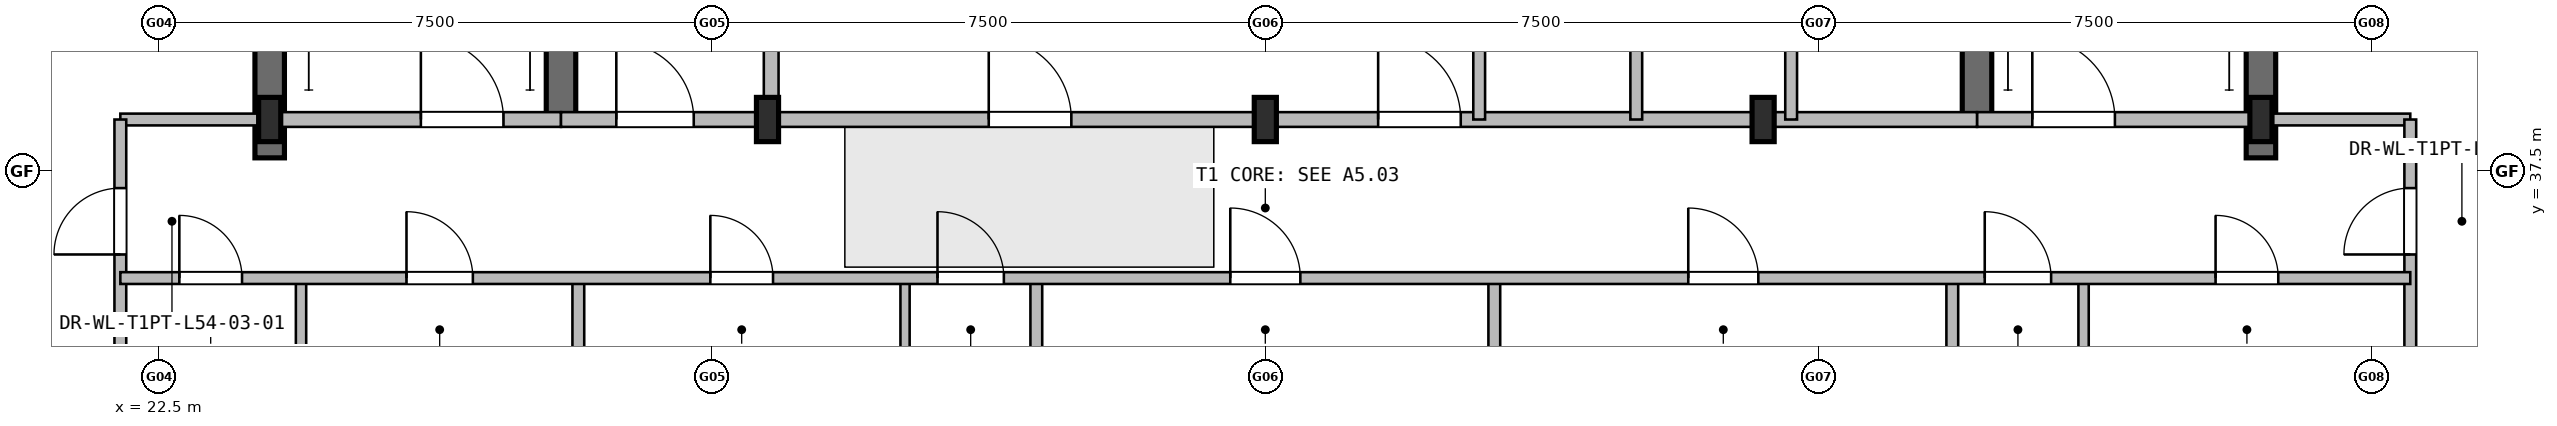
"""IFC4 building model, lengths in metres.
Left out: names, types, materials, properties, quantities, classifications, styles, units other than length and angle.
Written with IfcOpenShell. Run it as: python <this file> out.ifc"""

import sys

from ifc_helpers import new_model, si_unit, direction, frame, frame_2d, origin, origin_2d, place, context, subcontext, project, spatial, rectangle, i_section, extrude, element, fill, save


model = new_model("IFC4")
c1 = context("Model", 3, precision=1e-05, world=origin(), true_north=direction((0.0, 1.0)))
c2 = subcontext(c1, "Body", "Model", "MODEL_VIEW")
j1 = project(units=[si_unit("LENGTHUNIT", "METRE"), si_unit("PLANEANGLEUNIT", "RADIAN")], contexts=[c1])
p1 = place(None, origin())
s1 = spatial("IfcSite", under=j1, at=p1, CompositionType="ELEMENT")
p2 = place(p1, origin())
s2 = spatial("IfcBuilding", under=s1, at=p2, CompositionType="ELEMENT")
p3 = place(p2, frame((0.0, 0.0, 197.1)))
s3 = spatial("IfcBuildingStorey", under=s2, at=p3, CompositionType="ELEMENT", Elevation=197.1)
for number, where, z_axis, x_axis in (
    (1, (24.0, 37.68, 0.0), (0.0, 0.0, 1.0), (0.0, 1.0, 0.0)),
    (2, (51.0, 37.68, 0.0), (0.0, 0.0, 1.0), (0.0, 1.0, 0.0)),
):
    element("IfcWall", number, at=place(p3, frame(where, z_axis=z_axis, x_axis=x_axis)), inside=s3, PredefinedType="SHEAR", context=c2, shape_type="SweptSolid", body=[
        extrude(rectangle(XDim=10.32, YDim=0.4, at=frame_2d((5.16, 0.0))), origin(), (0.0, 0.0, 1.0), 4.2),
    ])
for number, where, z_axis, x_axis in (
    (3, (27.95, 38.2, 0.0), (0.0, 0.0, 1.0), (0.0, 1.0, 0.0)),
    (4, (47.15, 38.2, 0.0), (0.0, 0.0, 1.0), (0.0, 1.0, 0.0)),
):
    element("IfcWall", number, at=place(p3, frame(where, z_axis=z_axis, x_axis=x_axis)), inside=s3, PredefinedType="SHEAR", context=c2, shape_type="SweptSolid", body=[
        extrude(rectangle(XDim=9.8, YDim=0.4, at=frame_2d((4.9, 0.0))), origin(), (0.0, 0.0, 1.0), 4.2),
    ])
for number, where, z_axis, x_axis in (
    (5, (24.0, 38.2, 0.0), (0.0, 0.0, 1.0), (1.0, 0.0, 0.0)),
    (6, (30.75, 38.2, 0.0), (0.0, 0.0, 1.0), (1.0, 0.0, 0.0)),
    (7, (37.5, 38.2, 0.0), (0.0, 0.0, 1.0), (1.0, 0.0, 0.0)),
    (8, (44.25, 38.2, 0.0), (0.0, 0.0, 1.0), (1.0, 0.0, 0.0)),
    (9, (51.0, 38.2, 0.0), (0.0, 0.0, 1.0), (1.0, 0.0, 0.0)),
):
    element("IfcColumn", number, at=place(p3, frame(where, z_axis=z_axis, x_axis=x_axis)), inside=s3, PredefinedType="COLUMN", context=c2, shape_type="SweptSolid", body=[
        extrude(i_section(OverallWidth=0.3, OverallDepth=0.6, WebThickness=0.014, FlangeThickness=0.025, at=origin_2d()), origin(), (0.0, 0.0, 1.0), 4.2),
    ])
p4 = place(p3, frame((24.0, 38.2, 0.0), z_axis=(0.0, 0.0, 1.0), x_axis=(1.0, 0.0, 0.0)))
e10 = element("IfcWall", 10, at=p4, inside=s3, PredefinedType="PARTITIONING", context=c2, shape_type="SweptSolid", body=[
    extrude(rectangle(XDim=3.95, YDim=0.2, at=frame_2d((1.975, 0.0))), origin(), (0.0, 0.0, 1.0), 3.28),
])
p5 = place(p4, frame((2.05, 0.0, 0.0)))
e11 = element("IfcOpeningElement", 11, at=p5, cuts=e10, PredefinedType="OPENING", context=c2, shape_type="SweptSolid", body=[
    extrude(rectangle(XDim=1.12, YDim=2.1, at=frame_2d((0.56, 1.05))), frame((0.0, 0.11, 0.0), z_axis=(0.0, -1.0, 0.0), x_axis=(1.0, 0.0, 0.0)), (0.0, 0.0, 1.0), 0.22),
])
p6 = place(p3, frame((47.15, 38.2, 0.0), z_axis=(0.0, 0.0, 1.0), x_axis=(1.0, 0.0, 0.0)))
e12 = element("IfcWall", 12, at=p6, inside=s3, PredefinedType="PARTITIONING", context=c2, shape_type="SweptSolid", body=[
    extrude(rectangle(XDim=3.85, YDim=0.2, at=frame_2d((1.925, 0.0))), origin(), (0.0, 0.0, 1.0), 3.28),
])
p7 = place(p6, frame((0.75, 0.0, 0.0)))
e13 = element("IfcOpeningElement", 13, at=p7, cuts=e12, PredefinedType="OPENING", context=c2, shape_type="SweptSolid", body=[
    extrude(rectangle(XDim=1.12, YDim=2.1, at=frame_2d((0.56, 1.05))), frame((0.0, 0.11, 0.0), z_axis=(0.0, -1.0, 0.0), x_axis=(1.0, 0.0, 0.0)), (0.0, 0.0, 1.0), 0.22),
])
p8 = place(p3, frame((30.8, 38.2, 0.0), z_axis=(0.0, 0.0, 1.0), x_axis=(0.0, 1.0, 0.0)))
e14 = element("IfcWall", 14, at=p8, inside=s3, PredefinedType="PARTITIONING", context=c2, shape_type="SweptSolid", body=[
    extrude(rectangle(XDim=6.45, YDim=0.2, at=frame_2d((3.225, 0.0))), origin(), (0.0, 0.0, 1.0), 3.28),
])
p9 = place(p8, frame((3.59, 0.0, 0.0)))
e15 = element("IfcOpeningElement", 15, at=p9, cuts=e14, PredefinedType="OPENING", context=c2, shape_type="SweptSolid", body=[
    extrude(rectangle(XDim=1.05, YDim=2.1, at=frame_2d((0.525, 1.05))), frame((0.0, 0.11, 0.0), z_axis=(0.0, -1.0, 0.0), x_axis=(1.0, 0.0, 0.0)), (0.0, 0.0, 1.0), 0.22),
])
p10 = place(p3, frame((27.95, 38.2, 0.0), z_axis=(0.0, 0.0, 1.0), x_axis=(1.0, 0.0, 0.0)))
e16 = element("IfcWall", 16, at=p10, inside=s3, PredefinedType="PARTITIONING", context=c2, shape_type="SweptSolid", body=[
    extrude(rectangle(XDim=2.85, YDim=0.2, at=frame_2d((1.425, 0.0))), origin(), (0.0, 0.0, 1.0), 3.28),
])
p11 = place(p10, frame((0.75, 0.0, 0.0)))
e17 = element("IfcOpeningElement", 17, at=p11, cuts=e16, PredefinedType="OPENING", context=c2, shape_type="SweptSolid", body=[
    extrude(rectangle(XDim=1.05, YDim=2.1, at=frame_2d((0.525, 1.05))), frame((0.0, 0.11, 0.0), z_axis=(0.0, -1.0, 0.0), x_axis=(1.0, 0.0, 0.0)), (0.0, 0.0, 1.0), 0.22),
])
p12 = place(p3, frame((30.8, 38.2, 0.0), z_axis=(0.0, 0.0, 1.0), x_axis=(1.0, 0.0, 0.0)))
e18 = element("IfcWall", 18, at=p12, inside=s3, PredefinedType="PARTITIONING", context=c2, shape_type="SweptSolid", body=[
    extrude(rectangle(XDim=16.35, YDim=0.2, at=frame_2d((8.175, 0.0))), origin(), (0.0, 0.0, 1.0), 3.28),
])
p13 = place(p12, frame((2.95, 0.0, 0.0)))
e19 = element("IfcOpeningElement", 19, at=p13, cuts=e18, PredefinedType="OPENING", context=c2, shape_type="SweptSolid", body=[
    extrude(rectangle(XDim=1.12, YDim=2.1, at=frame_2d((0.56, 1.05))), frame((0.0, 0.11, 0.0), z_axis=(0.0, -1.0, 0.0), x_axis=(1.0, 0.0, 0.0)), (0.0, 0.0, 1.0), 0.22),
])
p14 = place(p12, frame((8.23, 0.0, 0.0)))
e20 = element("IfcOpeningElement", 20, at=p14, cuts=e18, PredefinedType="OPENING", context=c2, shape_type="SweptSolid", body=[
    extrude(rectangle(XDim=1.12, YDim=2.1, at=frame_2d((0.56, 1.05))), frame((0.0, 0.11, 0.0), z_axis=(0.0, -1.0, 0.0), x_axis=(1.0, 0.0, 0.0)), (0.0, 0.0, 1.0), 0.22),
])
for number, where, z_axis, x_axis in (
    (21, (40.4, 38.2, 0.0), (0.0, 0.0, 1.0), (0.0, 1.0, 0.0)),
    (22, (42.53, 38.2, 0.0), (0.0, 0.0, 1.0), (0.0, 1.0, 0.0)),
    (23, (44.63, 38.2, 0.0), (0.0, 0.0, 1.0), (0.0, 1.0, 0.0)),
):
    element("IfcWall", number, at=place(p3, frame(where, z_axis=z_axis, x_axis=x_axis)), inside=s3, PredefinedType="PARTITIONING", context=c2, shape_type="SweptSolid", body=[
        extrude(rectangle(XDim=3.05, YDim=0.16, at=frame_2d((1.525, 0.0))), origin(), (0.0, 0.0, 1.0), 3.88),
    ])
for number, where, z_axis, x_axis in (
    (24, (21.975, 38.2, 0.0), (0.0, 0.0, 1.0), (1.0, 0.0, 0.0)),
    (25, (51.0, 38.2, 0.0), (0.0, 0.0, 1.0), (1.0, 0.0, 0.0)),
):
    element("IfcWall", number, at=place(p3, frame(where, z_axis=z_axis, x_axis=x_axis)), inside=s3, PredefinedType="PARTITIONING", context=c2, shape_type="SweptSolid", body=[
        extrude(rectangle(XDim=2.025, YDim=0.16, at=frame_2d((1.012, 0.0))), origin(), (0.0, 0.0, 1.0), 3.28),
    ])
p15 = place(p3, frame((21.975, 22.55, 0.0), z_axis=(0.0, 0.0, 1.0), x_axis=(0.0, 1.0, 0.0)))
e26 = element("IfcWall", 26, at=p15, inside=s3, PredefinedType="PARTITIONING", context=c2, shape_type="SweptSolid", body=[
    extrude(rectangle(XDim=15.65, YDim=0.16, at=frame_2d((7.825, 0.0))), origin(), (0.0, 0.0, 1.0), 3.88),
])
p16 = place(p15, frame((13.82, 0.0, 0.0)))
e27 = element("IfcOpeningElement", 27, at=p16, cuts=e26, PredefinedType="OPENING", context=c2, shape_type="SweptSolid", body=[
    extrude(rectangle(XDim=0.9, YDim=2.05, at=frame_2d((0.45, 1.025))), frame((0.0, 0.09, 0.0), z_axis=(0.0, -1.0, 0.0), x_axis=(1.0, 0.0, 0.0)), (0.0, 0.0, 1.0), 0.18),
])
p17 = place(p3, frame((53.025, 22.55, 0.0), z_axis=(0.0, 0.0, 1.0), x_axis=(0.0, 1.0, 0.0)))
e28 = element("IfcWall", 28, at=p17, inside=s3, PredefinedType="PARTITIONING", context=c2, shape_type="SweptSolid", body=[
    extrude(rectangle(XDim=15.65, YDim=0.16, at=frame_2d((7.825, 0.0))), origin(), (0.0, 0.0, 1.0), 3.88),
])
p18 = place(p17, frame((13.82, 0.0, 0.0)))
e29 = element("IfcOpeningElement", 29, at=p18, cuts=e28, PredefinedType="OPENING", context=c2, shape_type="SweptSolid", body=[
    extrude(rectangle(XDim=0.9, YDim=2.05, at=frame_2d((0.45, 1.025))), frame((0.0, 0.09, 0.0), z_axis=(0.0, -1.0, 0.0), x_axis=(1.0, 0.0, 0.0)), (0.0, 0.0, 1.0), 0.18),
])
p19 = place(p3, frame((24.425, 34.1, 0.0), z_axis=(0.0, 0.0, 1.0), x_axis=(0.0, 1.0, 0.0)))
e30 = element("IfcWall", 30, at=p19, inside=s3, PredefinedType="PARTITIONING", context=c2, shape_type="SweptSolid", body=[
    extrude(rectangle(XDim=1.95, YDim=0.14, at=frame_2d((0.975, 0.0))), origin(), (0.0, 0.0, 1.0), 3.88),
])
p20 = place(p3, frame((28.185, 22.55, 0.0), z_axis=(0.0, 0.0, 1.0), x_axis=(0.0, 1.0, 0.0)))
e31 = element("IfcWall", 31, at=p20, inside=s3, PredefinedType="PARTITIONING", context=c2, shape_type="SweptSolid", body=[
    extrude(rectangle(XDim=13.5, YDim=0.16, at=frame_2d((6.75, 0.0))), origin(), (0.0, 0.0, 1.0), 3.88),
])
p21 = place(p3, frame((32.615, 34.1, 0.0), z_axis=(0.0, 0.0, 1.0), x_axis=(0.0, 1.0, 0.0)))
e32 = element("IfcWall", 32, at=p21, inside=s3, PredefinedType="PARTITIONING", context=c2, shape_type="SweptSolid", body=[
    extrude(rectangle(XDim=1.95, YDim=0.125, at=frame_2d((0.975, 0.0))), origin(), (0.0, 0.0, 1.0), 3.88),
])
for number, where, z_axis, x_axis in (
    (33, (34.395, 22.55, 0.0), (0.0, 0.0, 1.0), (0.0, 1.0, 0.0)),
    (34, (40.605, 22.55, 0.0), (0.0, 0.0, 1.0), (0.0, 1.0, 0.0)),
    (35, (46.815, 22.55, 0.0), (0.0, 0.0, 1.0), (0.0, 1.0, 0.0)),
):
    element("IfcWall", number, at=place(p3, frame(where, z_axis=z_axis, x_axis=x_axis)), inside=s3, PredefinedType="PARTITIONING", context=c2, shape_type="SweptSolid", body=[
        extrude(rectangle(XDim=13.5, YDim=0.16, at=frame_2d((6.75, 0.0))), origin(), (0.0, 0.0, 1.0), 3.88),
    ])
p22 = place(p3, frame((48.595, 34.1, 0.0), z_axis=(0.0, 0.0, 1.0), x_axis=(0.0, 1.0, 0.0)))
e36 = element("IfcWall", 36, at=p22, inside=s3, PredefinedType="PARTITIONING", context=c2, shape_type="SweptSolid", body=[
    extrude(rectangle(XDim=1.95, YDim=0.14, at=frame_2d((0.975, 0.0))), origin(), (0.0, 0.0, 1.0), 3.88),
])
p23 = place(p3, frame((21.975, 36.05, 0.0), z_axis=(0.0, 0.0, 1.0), x_axis=(1.0, 0.0, 0.0)))
e37 = element("IfcWall", 37, at=p23, inside=s3, PredefinedType="PARTITIONING", context=c2, shape_type="SweptSolid", body=[
    extrude(rectangle(XDim=31.05, YDim=0.16, at=frame_2d((15.525, 0.0))), origin(), (0.0, 0.0, 1.0), 3.88),
])
p24 = place(p23, frame((0.8, 0.0, 0.0)))
e38 = element("IfcOpeningElement", 38, at=p24, cuts=e37, PredefinedType="OPENING", context=c2, shape_type="SweptSolid", body=[
    extrude(rectangle(XDim=0.85, YDim=2.05, at=frame_2d((0.425, 1.025))), frame((0.0, 0.09, 0.0), z_axis=(0.0, -1.0, 0.0), x_axis=(1.0, 0.0, 0.0)), (0.0, 0.0, 1.0), 0.18),
])
p25 = place(p23, frame((3.88, 0.0, 0.0)))
e39 = element("IfcOpeningElement", 39, at=p25, cuts=e37, PredefinedType="OPENING", context=c2, shape_type="SweptSolid", body=[
    extrude(rectangle(XDim=0.9, YDim=2.05, at=frame_2d((0.45, 1.025))), frame((0.0, 0.09, 0.0), z_axis=(0.0, -1.0, 0.0), x_axis=(1.0, 0.0, 0.0)), (0.0, 0.0, 1.0), 0.18),
])
p26 = place(p23, frame((8.0, 0.0, 0.0)))
e40 = element("IfcOpeningElement", 40, at=p26, cuts=e37, PredefinedType="OPENING", context=c2, shape_type="SweptSolid", body=[
    extrude(rectangle(XDim=0.85, YDim=2.05, at=frame_2d((0.425, 1.025))), frame((0.0, 0.09, 0.0), z_axis=(0.0, -1.0, 0.0), x_axis=(1.0, 0.0, 0.0)), (0.0, 0.0, 1.0), 0.18),
])
p27 = place(p23, frame((11.08, 0.0, 0.0)))
e41 = element("IfcOpeningElement", 41, at=p27, cuts=e37, PredefinedType="OPENING", context=c2, shape_type="SweptSolid", body=[
    extrude(rectangle(XDim=0.9, YDim=2.05, at=frame_2d((0.45, 1.025))), frame((0.0, 0.09, 0.0), z_axis=(0.0, -1.0, 0.0), x_axis=(1.0, 0.0, 0.0)), (0.0, 0.0, 1.0), 0.18),
])
p28 = place(p23, frame((15.05, 0.0, 0.0)))
e42 = element("IfcOpeningElement", 42, at=p28, cuts=e37, PredefinedType="OPENING", context=c2, shape_type="SweptSolid", body=[
    extrude(rectangle(XDim=0.95, YDim=2.1, at=frame_2d((0.475, 1.05))), frame((0.0, 0.09, 0.0), z_axis=(0.0, -1.0, 0.0), x_axis=(1.0, 0.0, 0.0)), (0.0, 0.0, 1.0), 0.18),
])
p29 = place(p23, frame((21.26, 0.0, 0.0)))
e43 = element("IfcOpeningElement", 43, at=p29, cuts=e37, PredefinedType="OPENING", context=c2, shape_type="SweptSolid", body=[
    extrude(rectangle(XDim=0.95, YDim=2.1, at=frame_2d((0.475, 1.05))), frame((0.0, 0.09, 0.0), z_axis=(0.0, -1.0, 0.0), x_axis=(1.0, 0.0, 0.0)), (0.0, 0.0, 1.0), 0.18),
])
p30 = place(p23, frame((28.41, 0.0, 0.0)))
e44 = element("IfcOpeningElement", 44, at=p30, cuts=e37, PredefinedType="OPENING", context=c2, shape_type="SweptSolid", body=[
    extrude(rectangle(XDim=0.85, YDim=2.05, at=frame_2d((0.425, 1.025))), frame((0.0, 0.09, 0.0), z_axis=(0.0, -1.0, 0.0), x_axis=(1.0, 0.0, 0.0)), (0.0, 0.0, 1.0), 0.18),
])
p31 = place(p23, frame((25.28, 0.0, 0.0)))
e45 = element("IfcOpeningElement", 45, at=p31, cuts=e37, PredefinedType="OPENING", context=c2, shape_type="SweptSolid", body=[
    extrude(rectangle(XDim=0.9, YDim=2.05, at=frame_2d((0.45, 1.025))), frame((0.0, 0.09, 0.0), z_axis=(0.0, -1.0, 0.0), x_axis=(1.0, 0.0, 0.0)), (0.0, 0.0, 1.0), 0.18),
])
p32 = place(p5, origin())
e46 = element("IfcDoor", 46, at=p32, inside=s3, OperationType="SINGLE_SWING_LEFT", PredefinedType="DOOR", context=c2, shape_type="SweptSolid", body=[
    extrude(rectangle(XDim=1.12, YDim=2.1, at=frame_2d((0.56, 1.05))), frame((0.0, 0.025, 0.0), z_axis=(0.0, -1.0, 0.0), x_axis=(1.0, 0.0, 0.0)), (0.0, 0.0, 1.0), 0.05),
])
fill(e11, e46)
p33 = place(p7, origin())
e47 = element("IfcDoor", 47, at=p33, inside=s3, OperationType="SINGLE_SWING_RIGHT", PredefinedType="DOOR", context=c2, shape_type="SweptSolid", body=[
    extrude(rectangle(XDim=1.12, YDim=2.1, at=frame_2d((0.56, 1.05))), frame((0.0, 0.025, 0.0), z_axis=(0.0, -1.0, 0.0), x_axis=(1.0, 0.0, 0.0)), (0.0, 0.0, 1.0), 0.05),
])
fill(e13, e47)
p34 = place(p11, origin())
e48 = element("IfcDoor", 48, at=p34, inside=s3, OperationType="SINGLE_SWING_RIGHT", PredefinedType="DOOR", context=c2, shape_type="SweptSolid", body=[
    extrude(rectangle(XDim=1.05, YDim=2.1, at=frame_2d((0.525, 1.05))), frame((0.0, 0.025, 0.0), z_axis=(0.0, -1.0, 0.0), x_axis=(1.0, 0.0, 0.0)), (0.0, 0.0, 1.0), 0.05),
])
fill(e17, e48)
p35 = place(p13, origin())
e49 = element("IfcDoor", 49, at=p35, inside=s3, OperationType="SINGLE_SWING_LEFT", PredefinedType="DOOR", context=c2, shape_type="SweptSolid", body=[
    extrude(rectangle(XDim=1.12, YDim=2.1, at=frame_2d((0.56, 1.05))), frame((0.0, 0.025, 0.0), z_axis=(0.0, -1.0, 0.0), x_axis=(1.0, 0.0, 0.0)), (0.0, 0.0, 1.0), 0.05),
])
fill(e19, e49)
p36 = place(p14, origin())
e50 = element("IfcDoor", 50, at=p36, inside=s3, OperationType="SINGLE_SWING_RIGHT", PredefinedType="DOOR", context=c2, shape_type="SweptSolid", body=[
    extrude(rectangle(XDim=1.12, YDim=2.1, at=frame_2d((0.56, 1.05))), frame((0.0, 0.025, 0.0), z_axis=(0.0, -1.0, 0.0), x_axis=(1.0, 0.0, 0.0)), (0.0, 0.0, 1.0), 0.05),
])
fill(e20, e50)
p37 = place(p16, origin())
e51 = element("IfcDoor", 51, at=p37, inside=s3, OperationType="SINGLE_SWING_LEFT", PredefinedType="DOOR", context=c2, shape_type="SweptSolid", body=[
    extrude(rectangle(XDim=0.9, YDim=2.05, at=frame_2d((0.45, 1.025))), frame((0.0, 0.025, 0.0), z_axis=(0.0, -1.0, 0.0), x_axis=(1.0, 0.0, 0.0)), (0.0, 0.0, 1.0), 0.05),
])
fill(e27, e51)
p38 = place(p18, origin())
e52 = element("IfcDoor", 52, at=p38, inside=s3, OperationType="SINGLE_SWING_RIGHT", PredefinedType="DOOR", context=c2, shape_type="SweptSolid", body=[
    extrude(rectangle(XDim=0.9, YDim=2.05, at=frame_2d((0.45, 1.025))), frame((0.0, 0.025, 0.0), z_axis=(0.0, -1.0, 0.0), x_axis=(1.0, 0.0, 0.0)), (0.0, 0.0, 1.0), 0.05),
])
fill(e29, e52)
p39 = place(p24, origin())
e53 = element("IfcDoor", 53, at=p39, inside=s3, OperationType="SINGLE_SWING_LEFT", PredefinedType="DOOR", context=c2, shape_type="SweptSolid", body=[
    extrude(rectangle(XDim=0.85, YDim=2.05, at=frame_2d((0.425, 1.025))), frame((0.0, 0.025, 0.0), z_axis=(0.0, -1.0, 0.0), x_axis=(1.0, 0.0, 0.0)), (0.0, 0.0, 1.0), 0.05),
])
fill(e38, e53)
p40 = place(p25, origin())
e54 = element("IfcDoor", 54, at=p40, inside=s3, OperationType="SINGLE_SWING_RIGHT", PredefinedType="DOOR", context=c2, shape_type="SweptSolid", body=[
    extrude(rectangle(XDim=0.9, YDim=2.05, at=frame_2d((0.45, 1.025))), frame((0.0, 0.025, 0.0), z_axis=(0.0, -1.0, 0.0), x_axis=(1.0, 0.0, 0.0)), (0.0, 0.0, 1.0), 0.05),
])
fill(e39, e54)
p41 = place(p26, origin())
e55 = element("IfcDoor", 55, at=p41, inside=s3, OperationType="SINGLE_SWING_LEFT", PredefinedType="DOOR", context=c2, shape_type="SweptSolid", body=[
    extrude(rectangle(XDim=0.85, YDim=2.05, at=frame_2d((0.425, 1.025))), frame((0.0, 0.025, 0.0), z_axis=(0.0, -1.0, 0.0), x_axis=(1.0, 0.0, 0.0)), (0.0, 0.0, 1.0), 0.05),
])
fill(e40, e55)
p42 = place(p27, origin())
e56 = element("IfcDoor", 56, at=p42, inside=s3, OperationType="SINGLE_SWING_RIGHT", PredefinedType="DOOR", context=c2, shape_type="SweptSolid", body=[
    extrude(rectangle(XDim=0.9, YDim=2.05, at=frame_2d((0.45, 1.025))), frame((0.0, 0.025, 0.0), z_axis=(0.0, -1.0, 0.0), x_axis=(1.0, 0.0, 0.0)), (0.0, 0.0, 1.0), 0.05),
])
fill(e41, e56)
p43 = place(p28, origin())
e57 = element("IfcDoor", 57, at=p43, inside=s3, OperationType="SINGLE_SWING_LEFT", PredefinedType="DOOR", context=c2, shape_type="SweptSolid", body=[
    extrude(rectangle(XDim=0.95, YDim=2.1, at=frame_2d((0.475, 1.05))), frame((0.0, 0.025, 0.0), z_axis=(0.0, -1.0, 0.0), x_axis=(1.0, 0.0, 0.0)), (0.0, 0.0, 1.0), 0.05),
])
fill(e42, e57)
p44 = place(p29, origin())
e58 = element("IfcDoor", 58, at=p44, inside=s3, OperationType="SINGLE_SWING_RIGHT", PredefinedType="DOOR", context=c2, shape_type="SweptSolid", body=[
    extrude(rectangle(XDim=0.95, YDim=2.1, at=frame_2d((0.475, 1.05))), frame((0.0, 0.025, 0.0), z_axis=(0.0, -1.0, 0.0), x_axis=(1.0, 0.0, 0.0)), (0.0, 0.0, 1.0), 0.05),
])
fill(e43, e58)
p45 = place(p30, origin())
e59 = element("IfcDoor", 59, at=p45, inside=s3, OperationType="SINGLE_SWING_LEFT", PredefinedType="DOOR", context=c2, shape_type="SweptSolid", body=[
    extrude(rectangle(XDim=0.85, YDim=2.05, at=frame_2d((0.425, 1.025))), frame((0.0, 0.025, 0.0), z_axis=(0.0, -1.0, 0.0), x_axis=(1.0, 0.0, 0.0)), (0.0, 0.0, 1.0), 0.05),
])
fill(e44, e59)
p46 = place(p31, origin())
e60 = element("IfcDoor", 60, at=p46, inside=s3, OperationType="SINGLE_SWING_RIGHT", PredefinedType="DOOR", context=c2, shape_type="SweptSolid", body=[
    extrude(rectangle(XDim=0.9, YDim=2.05, at=frame_2d((0.45, 1.025))), frame((0.0, 0.025, 0.0), z_axis=(0.0, -1.0, 0.0), x_axis=(1.0, 0.0, 0.0)), (0.0, 0.0, 1.0), 0.05),
])
fill(e45, e60)
save(model, sys.argv[1])
